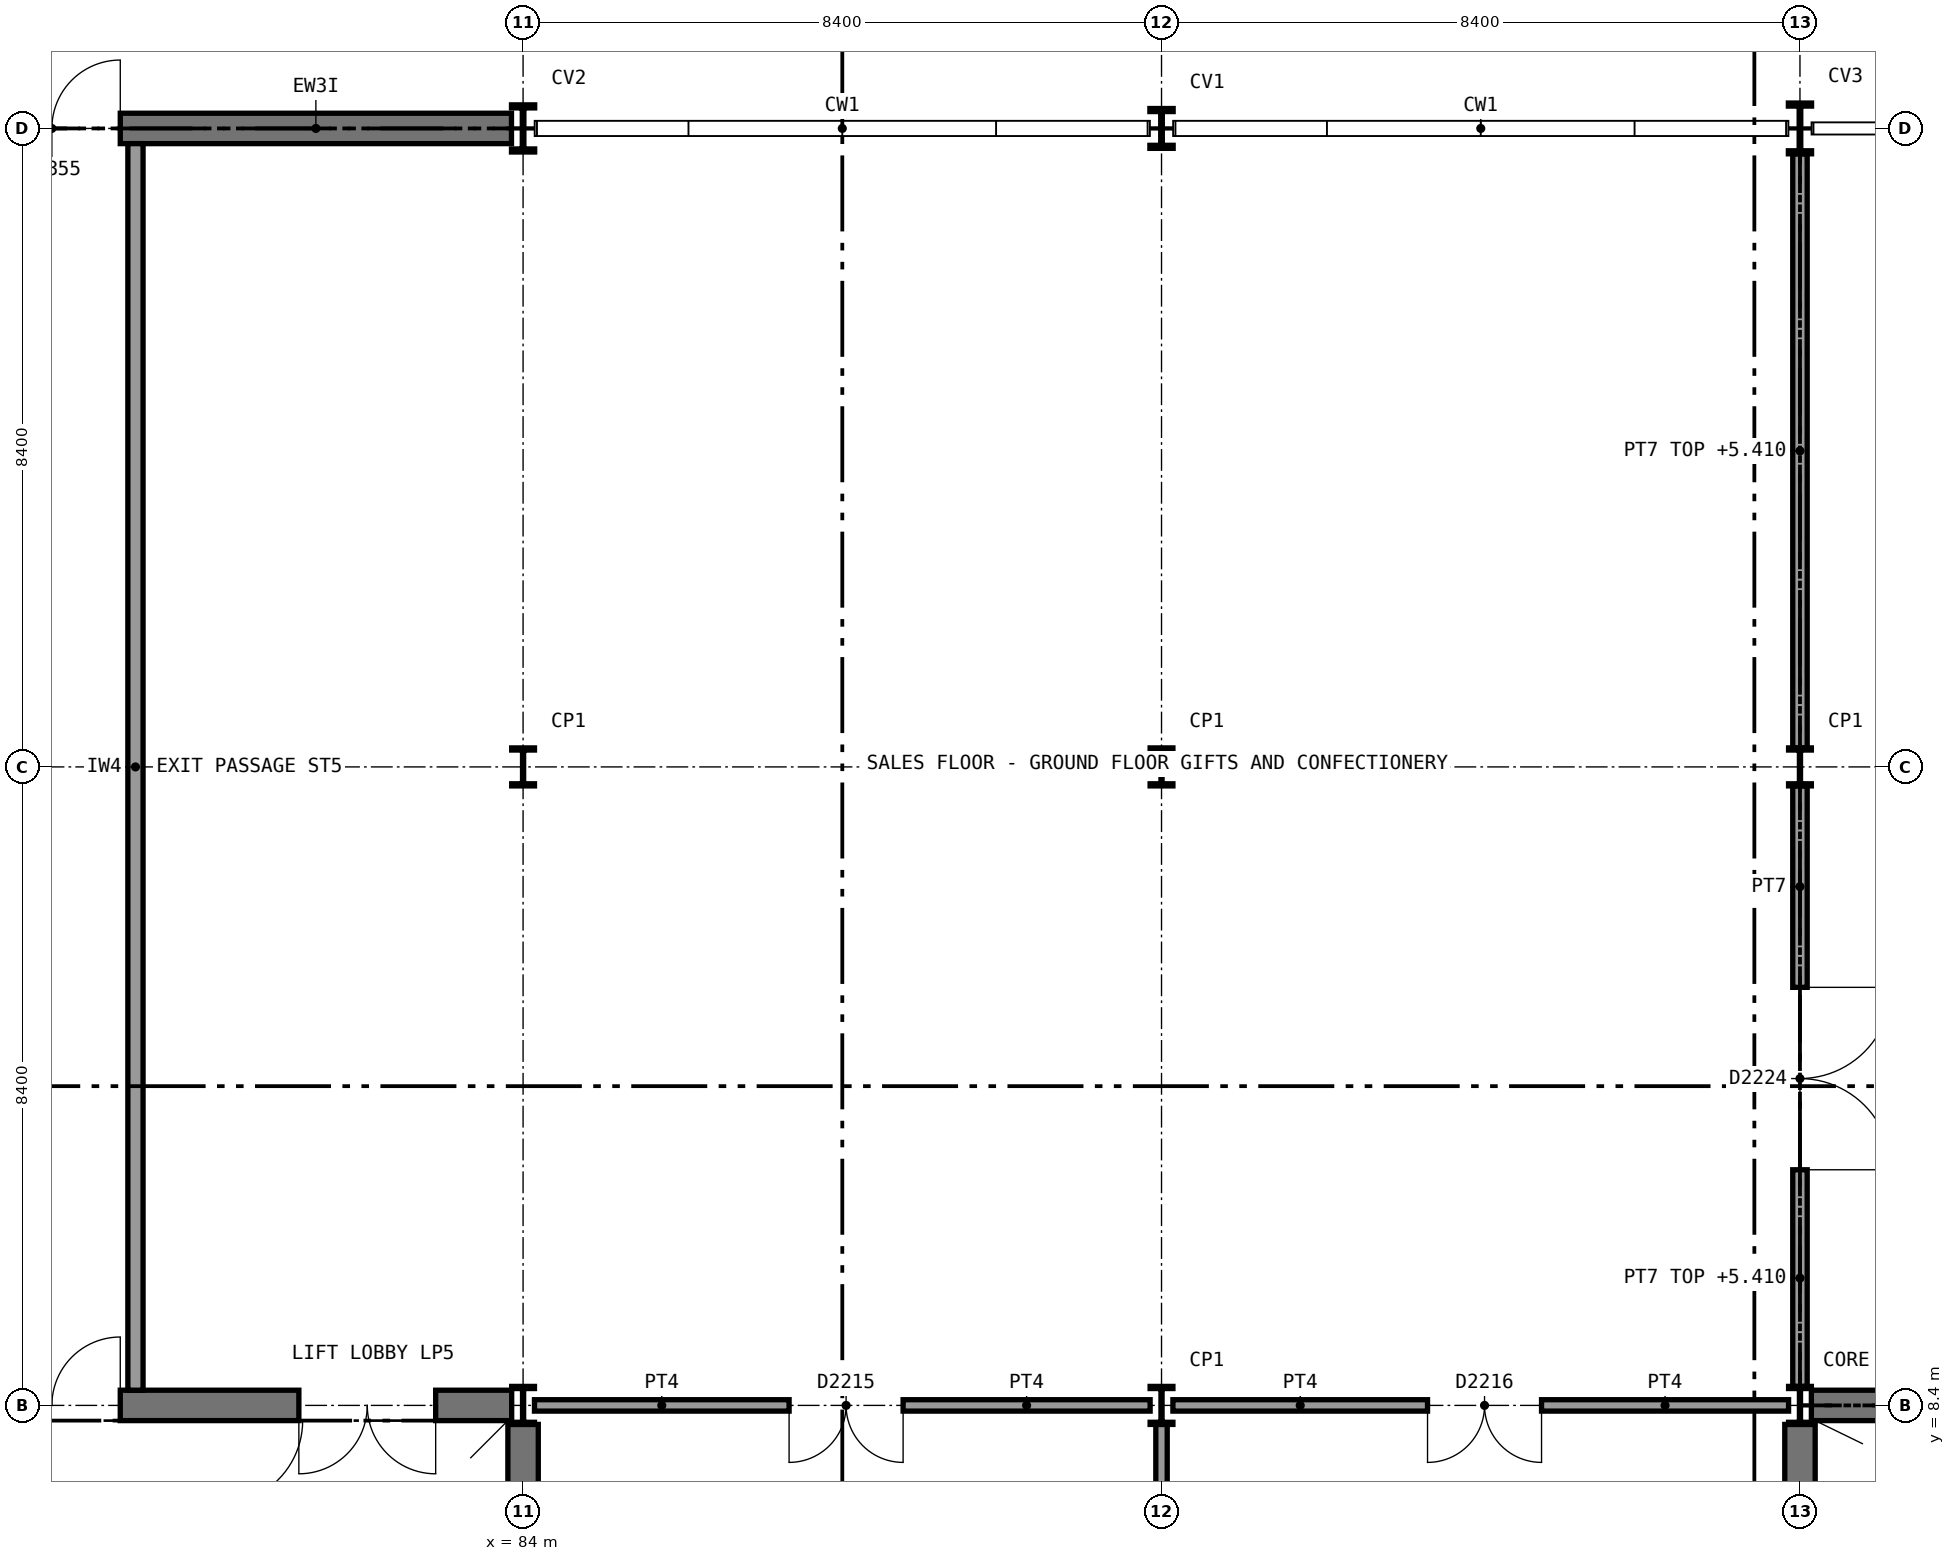
"""IFC4 building model, lengths in metres.
Left out: names, types, materials, properties, quantities, classifications, styles, units other than length and angle.
Written with IfcOpenShell. Run it as: python <this file> out.ifc"""

import sys

from ifc_helpers import new_model, si_unit, direction, frame, frame_2d, origin, origin_2d, place, context, subcontext, project, spatial, rectangle, i_section, extrude, element, fill, save


model = new_model("IFC4")
c1 = context("Model", 3, precision=1e-05, world=origin(), true_north=direction((0.0, 1.0)))
c2 = subcontext(c1, "Body", "Model", "MODEL_VIEW")
j1 = project(units=[si_unit("LENGTHUNIT", "METRE"), si_unit("PLANEANGLEUNIT", "RADIAN")], contexts=[c1])
p1 = place(None, origin())
s1 = spatial("IfcSite", under=j1, at=p1, CompositionType="ELEMENT")
p2 = place(p1, origin())
s2 = spatial("IfcBuilding", under=s1, at=p2, CompositionType="ELEMENT")
p3 = place(p2, origin())
s3 = spatial("IfcBuildingStorey", under=s2, at=p3, CompositionType="ELEMENT", Elevation=0.0)
p4 = place(p3, frame((75.75, 8.4, 0.0), z_axis=(0.0, 0.0, 1.0), x_axis=(1.0, 0.0, 0.0)))
e1 = element("IfcWall", 1, at=p4, inside=s3, PredefinedType="SHEAR", context=c2, shape_type="SweptSolid", body=[
    extrude(rectangle(XDim=8.1, YDim=0.4, at=frame_2d((4.05, 0.0))), origin(), (0.0, 0.0, 1.0), 5.85),
])
p5 = place(p4, frame((5.3, 0.0, 0.0)))
e2 = element("IfcOpeningElement", 2, at=p5, cuts=e1, PredefinedType="OPENING", context=c2, shape_type="SweptSolid", body=[
    extrude(rectangle(XDim=1.8, YDim=2.1, at=frame_2d((0.9, 1.05))), frame((0.0, 0.21, 0.0), z_axis=(0.0, -1.0, 0.0), x_axis=(1.0, 0.0, 0.0)), (0.0, 0.0, 1.0), 0.42),
])
p6 = place(p4, frame((1.15, 0.0, 0.0)))
e3 = element("IfcOpeningElement", 3, at=p6, cuts=e1, PredefinedType="OPENING", context=c2, shape_type="SweptSolid", body=[
    extrude(rectangle(XDim=1.8, YDim=2.1, at=frame_2d((0.9, 1.05))), frame((0.0, 0.21, 0.0), z_axis=(0.0, -1.0, 0.0), x_axis=(1.0, 0.0, 0.0)), (0.0, 0.0, 1.0), 0.42),
])
p7 = place(p3, frame((84.0, 0.25, 0.0), z_axis=(0.0, 0.0, 1.0), x_axis=(0.0, 1.0, 0.0)))
e4 = element("IfcWall", 4, at=p7, inside=s3, PredefinedType="SHEAR", context=c2, shape_type="SweptSolid", body=[
    extrude(rectangle(XDim=7.9, YDim=0.4, at=frame_2d((3.95, 0.0))), origin(), (0.0, 0.0, 1.0), 5.85),
])
p8 = place(p3, frame((100.95, 8.4, 0.0), z_axis=(0.0, 0.0, 1.0), x_axis=(1.0, 0.0, 0.0)))
e5 = element("IfcWall", 5, at=p8, inside=s3, PredefinedType="SHEAR", context=c2, shape_type="SweptSolid", body=[
    extrude(rectangle(XDim=16.4, YDim=0.4, at=frame_2d((8.2, 0.0))), origin(), (0.0, 0.0, 1.0), 5.85),
])
p9 = place(p8, frame((13.55, 0.0, 0.0)))
e6 = element("IfcOpeningElement", 6, at=p9, cuts=e5, PredefinedType="OPENING", context=c2, shape_type="SweptSolid", body=[
    extrude(rectangle(XDim=1.8, YDim=2.1, at=frame_2d((0.9, 1.05))), frame((0.0, 0.21, 0.0), z_axis=(0.0, -1.0, 0.0), x_axis=(1.0, 0.0, 0.0)), (0.0, 0.0, 1.0), 0.42),
])
p10 = place(p8, frame((4.65, 0.0, 0.0)))
e7 = element("IfcOpeningElement", 7, at=p10, cuts=e5, PredefinedType="OPENING", context=c2, shape_type="SweptSolid", body=[
    extrude(rectangle(XDim=2.4, YDim=2.4, at=frame_2d((1.2, 1.2))), frame((0.0, 0.21, 0.0), z_axis=(0.0, -1.0, 0.0), x_axis=(1.0, 0.0, 0.0)), (0.0, 0.0, 1.0), 0.42),
])
p11 = place(p3, frame((100.8, 0.25, 0.0), z_axis=(0.0, 0.0, 1.0), x_axis=(0.0, 1.0, 0.0)))
e8 = element("IfcWall", 8, at=p11, inside=s3, PredefinedType="SHEAR", context=c2, shape_type="SweptSolid", body=[
    extrude(rectangle(XDim=7.9, YDim=0.4, at=frame_2d((3.95, 0.0))), origin(), (0.0, 0.0, 1.0), 5.85),
])
for number, where, z_axis, x_axis in (
    (9, (84.0, 8.4, 0.0), (0.0, 0.0, 1.0), (1.0, 0.0, 0.0)),
    (10, (84.0, 16.8, 0.0), (0.0, 0.0, 1.0), (1.0, 0.0, 0.0)),
):
    element("IfcColumn", number, at=place(p3, frame(where, z_axis=z_axis, x_axis=x_axis)), inside=s3, PredefinedType="COLUMN", context=c2, shape_type="SweptSolid", body=[
        extrude(i_section(OverallWidth=0.3, OverallDepth=0.5, WebThickness=0.014, FlangeThickness=0.028, FilletRadius=0.027, at=origin_2d()), origin(), (0.0, 0.0, 1.0), 6.0),
    ])
p12 = place(p3, frame((84.0, 25.2, 0.0), z_axis=(0.0, 0.0, 1.0), x_axis=(1.0, 0.0, 0.0)))
e11 = element("IfcColumn", 11, at=p12, inside=s3, PredefinedType="COLUMN", context=c2, shape_type="SweptSolid", body=[
    extrude(i_section(OverallWidth=0.305, OverallDepth=0.62, WebThickness=0.021, FlangeThickness=0.04, FilletRadius=0.027, at=origin_2d()), origin(), (0.0, 0.0, 1.0), 6.0),
])
for number, where, z_axis, x_axis in (
    (12, (92.4, 8.4, 0.0), (0.0, 0.0, 1.0), (1.0, 0.0, 0.0)),
    (13, (92.4, 16.8, 0.0), (0.0, 0.0, 1.0), (1.0, 0.0, 0.0)),
):
    element("IfcColumn", number, at=place(p3, frame(where, z_axis=z_axis, x_axis=x_axis)), inside=s3, PredefinedType="COLUMN", context=c2, shape_type="SweptSolid", body=[
        extrude(i_section(OverallWidth=0.3, OverallDepth=0.5, WebThickness=0.014, FlangeThickness=0.028, FilletRadius=0.027, at=origin_2d()), origin(), (0.0, 0.0, 1.0), 6.0),
    ])
p13 = place(p3, frame((92.4, 25.2, 0.0), z_axis=(0.0, 0.0, 1.0), x_axis=(1.0, 0.0, 0.0)))
e14 = element("IfcColumn", 14, at=p13, inside=s3, PredefinedType="COLUMN", context=c2, shape_type="SweptSolid", body=[
    extrude(i_section(OverallWidth=0.306, OverallDepth=0.524, WebThickness=0.021, FlangeThickness=0.04, FilletRadius=0.027, at=origin_2d()), origin(), (0.0, 0.0, 1.0), 6.0),
])
for number, where, z_axis, x_axis in (
    (15, (100.8, 8.4, 0.0), (0.0, 0.0, 1.0), (1.0, 0.0, 0.0)),
    (16, (100.8, 16.8, 0.0), (0.0, 0.0, 1.0), (1.0, 0.0, 0.0)),
):
    element("IfcColumn", number, at=place(p3, frame(where, z_axis=z_axis, x_axis=x_axis)), inside=s3, PredefinedType="COLUMN", context=c2, shape_type="SweptSolid", body=[
        extrude(i_section(OverallWidth=0.3, OverallDepth=0.5, WebThickness=0.014, FlangeThickness=0.028, FilletRadius=0.027, at=origin_2d()), origin(), (0.0, 0.0, 1.0), 6.0),
    ])
p14 = place(p3, frame((100.8, 25.2, 0.0), z_axis=(0.0, 0.0, 1.0), x_axis=(1.0, 0.0, 0.0)))
e17 = element("IfcColumn", 17, at=p14, inside=s3, PredefinedType="COLUMN", context=c2, shape_type="SweptSolid", body=[
    extrude(i_section(OverallWidth=0.305, OverallDepth=0.668, WebThickness=0.021, FlangeThickness=0.04, FilletRadius=0.027, at=origin_2d()), origin(), (0.0, 0.0, 1.0), 6.0),
])
p15 = place(p3, frame((92.4, 0.25, 0.0), z_axis=(0.0, 0.0, 1.0), x_axis=(0.0, 1.0, 0.0)))
e18 = element("IfcWall", 18, at=p15, inside=s3, PredefinedType="SOLIDWALL", context=c2, shape_type="SweptSolid", body=[
    extrude(rectangle(XDim=7.9, YDim=0.15, at=frame_2d((3.95, 0.0))), origin(), (0.0, 0.0, 1.0), 5.41),
])
p16 = place(p3, frame((84.15, 8.4, 0.0), z_axis=(0.0, 0.0, 1.0), x_axis=(1.0, 0.0, 0.0)))
e19 = element("IfcWall", 19, at=p16, inside=s3, PredefinedType="SOLIDWALL", context=c2, shape_type="SweptSolid", body=[
    extrude(rectangle(XDim=8.1, YDim=0.15, at=frame_2d((4.05, 0.0))), origin(), (0.0, 0.0, 1.0), 5.52),
])
p17 = place(p16, frame((3.35, 0.0, 0.0)))
e20 = element("IfcOpeningElement", 20, at=p17, cuts=e19, PredefinedType="OPENING", context=c2, shape_type="SweptSolid", body=[
    extrude(rectangle(XDim=1.5, YDim=2.1, at=frame_2d((0.75, 1.05))), frame((0.0, 0.085, 0.0), z_axis=(0.0, -1.0, 0.0), x_axis=(1.0, 0.0, 0.0)), (0.0, 0.0, 1.0), 0.17),
])
p18 = place(p3, frame((92.55, 8.4, 0.0), z_axis=(0.0, 0.0, 1.0), x_axis=(1.0, 0.0, 0.0)))
e21 = element("IfcWall", 21, at=p18, inside=s3, PredefinedType="SOLIDWALL", context=c2, shape_type="SweptSolid", body=[
    extrude(rectangle(XDim=8.1, YDim=0.15, at=frame_2d((4.05, 0.0))), origin(), (0.0, 0.0, 1.0), 5.52),
])
p19 = place(p18, frame((3.35, 0.0, 0.0)))
e22 = element("IfcOpeningElement", 22, at=p19, cuts=e21, PredefinedType="OPENING", context=c2, shape_type="SweptSolid", body=[
    extrude(rectangle(XDim=1.5, YDim=2.1, at=frame_2d((0.75, 1.05))), frame((0.0, 0.085, 0.0), z_axis=(0.0, -1.0, 0.0), x_axis=(1.0, 0.0, 0.0)), (0.0, 0.0, 1.0), 0.17),
])
p20 = place(p3, frame((100.8, 8.65, 0.0), z_axis=(0.0, 0.0, 1.0), x_axis=(0.0, 1.0, 0.0)))
e23 = element("IfcWall", 23, at=p20, inside=s3, PredefinedType="SOLIDWALL", context=c2, shape_type="SweptSolid", body=[
    extrude(rectangle(XDim=7.9, YDim=0.19, at=frame_2d((3.95, 0.0))), origin(), (0.0, 0.0, 1.0), 5.41),
])
p21 = place(p20, frame((2.85, 0.0, 0.0)))
e24 = element("IfcOpeningElement", 24, at=p21, cuts=e23, PredefinedType="OPENING", context=c2, shape_type="SweptSolid", body=[
    extrude(rectangle(XDim=2.4, YDim=2.4, at=frame_2d((1.2, 1.2))), frame((0.0, 0.105, 0.0), z_axis=(0.0, -1.0, 0.0), x_axis=(1.0, 0.0, 0.0)), (0.0, 0.0, 1.0), 0.21),
])
p22 = place(p3, frame((100.8, 17.05, 0.0), z_axis=(0.0, 0.0, 1.0), x_axis=(0.0, 1.0, 0.0)))
e25 = element("IfcWall", 25, at=p22, inside=s3, PredefinedType="SOLIDWALL", context=c2, shape_type="SweptSolid", body=[
    extrude(rectangle(XDim=7.816, YDim=0.19, at=frame_2d((3.908, 0.0))), origin(), (0.0, 0.0, 1.0), 5.41),
])
p23 = place(p3, frame((75.753, 25.2, 0.0), z_axis=(0.0, 0.0, 1.0), x_axis=(1.0, 0.0, 0.0)))
e26 = element("IfcWall", 26, at=p23, inside=s3, PredefinedType="STANDARD", context=c2, shape_type="SweptSolid", body=[
    extrude(rectangle(XDim=8.095, YDim=0.4, at=frame_2d((4.047, 0.0))), origin(), (0.0, 0.0, 1.0), 5.85),
])
p24 = place(p23, frame((1.147, 0.0, 0.0)))
e27 = element("IfcOpeningElement", 27, at=p24, cuts=e26, PredefinedType="OPENING", context=c2, shape_type="SweptSolid", body=[
    extrude(rectangle(XDim=1.8, YDim=2.1, at=frame_2d((0.9, 1.05))), frame((0.0, 0.21, 0.0), z_axis=(0.0, -1.0, 0.0), x_axis=(1.0, 0.0, 0.0)), (0.0, 0.0, 1.0), 0.42),
])
p25 = place(p3, frame((80.0, 0.2, 0.0), z_axis=(0.0, 0.0, 1.0), x_axis=(0.0, 1.0, 0.0)))
e28 = element("IfcWall", 28, at=p25, inside=s3, PredefinedType="SHEAR", context=c2, shape_type="SweptSolid", body=[
    extrude(rectangle(XDim=8.0, YDim=0.2, at=frame_2d((4.0, 0.0))), origin(), (0.0, 0.0, 1.0), 5.85),
])
p26 = place(p25, frame((6.9, 0.0, 0.0)))
e29 = element("IfcOpeningElement", 29, at=p26, cuts=e28, PredefinedType="OPENING", context=c2, shape_type="SweptSolid", body=[
    extrude(rectangle(XDim=1.11, YDim=2.1, at=frame_2d((0.555, 1.05))), frame((0.0, 0.11, 0.0), z_axis=(0.0, -1.0, 0.0), x_axis=(1.0, 0.0, 0.0)), (0.0, 0.0, 1.0), 0.22),
])
p27 = place(p3, frame((78.9, 8.6, 0.0), z_axis=(0.0, 0.0, 1.0), x_axis=(0.0, 1.0, 0.0)))
e30 = element("IfcWall", 30, at=p27, inside=s3, PredefinedType="PARTITIONING", context=c2, shape_type="SweptSolid", body=[
    extrude(rectangle(XDim=16.4, YDim=0.2, at=frame_2d((8.2, 0.0))), origin(), (0.0, 0.0, 1.0), 5.85),
])
p28 = place(p17, frame((1.5, 0.0, 0.0), z_axis=(0.0, 0.0, 1.0), x_axis=(-1.0, 0.0, 0.0)))
e31 = element("IfcDoor", 31, at=p28, inside=s3, OperationType="DOUBLE_DOOR_SINGLE_SWING", PredefinedType="DOOR", context=c2, shape_type="SweptSolid", body=[
    extrude(rectangle(XDim=1.5, YDim=2.1, at=frame_2d((0.75, 1.05))), frame((0.0, 0.025, 0.0), z_axis=(0.0, -1.0, 0.0), x_axis=(1.0, 0.0, 0.0)), (0.0, 0.0, 1.0), 0.05),
])
fill(e20, e31)
p29 = place(p19, frame((1.5, 0.0, 0.0), z_axis=(0.0, 0.0, 1.0), x_axis=(-1.0, 0.0, 0.0)))
e32 = element("IfcDoor", 32, at=p29, inside=s3, OperationType="DOUBLE_DOOR_SINGLE_SWING", PredefinedType="DOOR", context=c2, shape_type="SweptSolid", body=[
    extrude(rectangle(XDim=1.5, YDim=2.1, at=frame_2d((0.75, 1.05))), frame((0.0, 0.025, 0.0), z_axis=(0.0, -1.0, 0.0), x_axis=(1.0, 0.0, 0.0)), (0.0, 0.0, 1.0), 0.05),
])
fill(e22, e32)
p30 = place(p21, frame((2.4, 0.0, 0.0), z_axis=(0.0, 0.0, 1.0), x_axis=(-1.0, 0.0, 0.0)))
e33 = element("IfcDoor", 33, at=p30, inside=s3, OperationType="DOUBLE_DOOR_SINGLE_SWING", PredefinedType="DOOR", context=c2, shape_type="SweptSolid", body=[
    extrude(rectangle(XDim=2.4, YDim=2.4, at=frame_2d((1.2, 1.2))), frame((0.0, 0.025, 0.0), z_axis=(0.0, -1.0, 0.0), x_axis=(1.0, 0.0, 0.0)), (0.0, 0.0, 1.0), 0.05),
])
fill(e24, e33)
p31 = place(p26, frame((1.1, 0.0, 0.0), z_axis=(0.0, 0.0, 1.0), x_axis=(-1.0, 0.0, 0.0)))
e34 = element("IfcDoor", 34, at=p31, inside=s3, OperationType="SINGLE_SWING_LEFT", PredefinedType="DOOR", context=c2, shape_type="SweptSolid", body=[
    extrude(rectangle(XDim=1.1, YDim=2.1, at=frame_2d((0.55, 1.05))), frame((0.0, 0.025, 0.0), z_axis=(0.0, -1.0, 0.0), x_axis=(1.0, 0.0, 0.0)), (0.0, 0.0, 1.0), 0.05),
])
fill(e29, e34)
p32 = place(p5, frame((1.8, 0.0, 0.0), z_axis=(0.0, 0.0, 1.0), x_axis=(-1.0, 0.0, 0.0)))
e35 = element("IfcDoor", 35, at=p32, inside=s3, OperationType="DOUBLE_DOOR_SINGLE_SWING", PredefinedType="DOOR", context=c2, shape_type="SweptSolid", body=[
    extrude(rectangle(XDim=1.8, YDim=2.1, at=frame_2d((0.9, 1.05))), frame((0.0, 0.025, 0.0), z_axis=(0.0, -1.0, 0.0), x_axis=(1.0, 0.0, 0.0)), (0.0, 0.0, 1.0), 0.05),
])
fill(e2, e35)
p33 = place(p6, origin())
e36 = element("IfcDoor", 36, at=p33, inside=s3, OperationType="DOUBLE_DOOR_SINGLE_SWING", PredefinedType="DOOR", context=c2, shape_type="SweptSolid", body=[
    extrude(rectangle(XDim=1.8, YDim=2.1, at=frame_2d((0.9, 1.05))), frame((0.0, 0.025, 0.0), z_axis=(0.0, -1.0, 0.0), x_axis=(1.0, 0.0, 0.0)), (0.0, 0.0, 1.0), 0.05),
])
fill(e3, e36)
p34 = place(p24, origin())
e37 = element("IfcDoor", 37, at=p34, inside=s3, OperationType="DOUBLE_DOOR_SINGLE_SWING", PredefinedType="DOOR", context=c2, shape_type="SweptSolid", body=[
    extrude(rectangle(XDim=1.8, YDim=2.1, at=frame_2d((0.9, 1.05))), frame((0.0, 0.025, 0.0), z_axis=(0.0, -1.0, 0.0), x_axis=(1.0, 0.0, 0.0)), (0.0, 0.0, 1.0), 0.05),
])
fill(e27, e37)
save(model, sys.argv[1])
